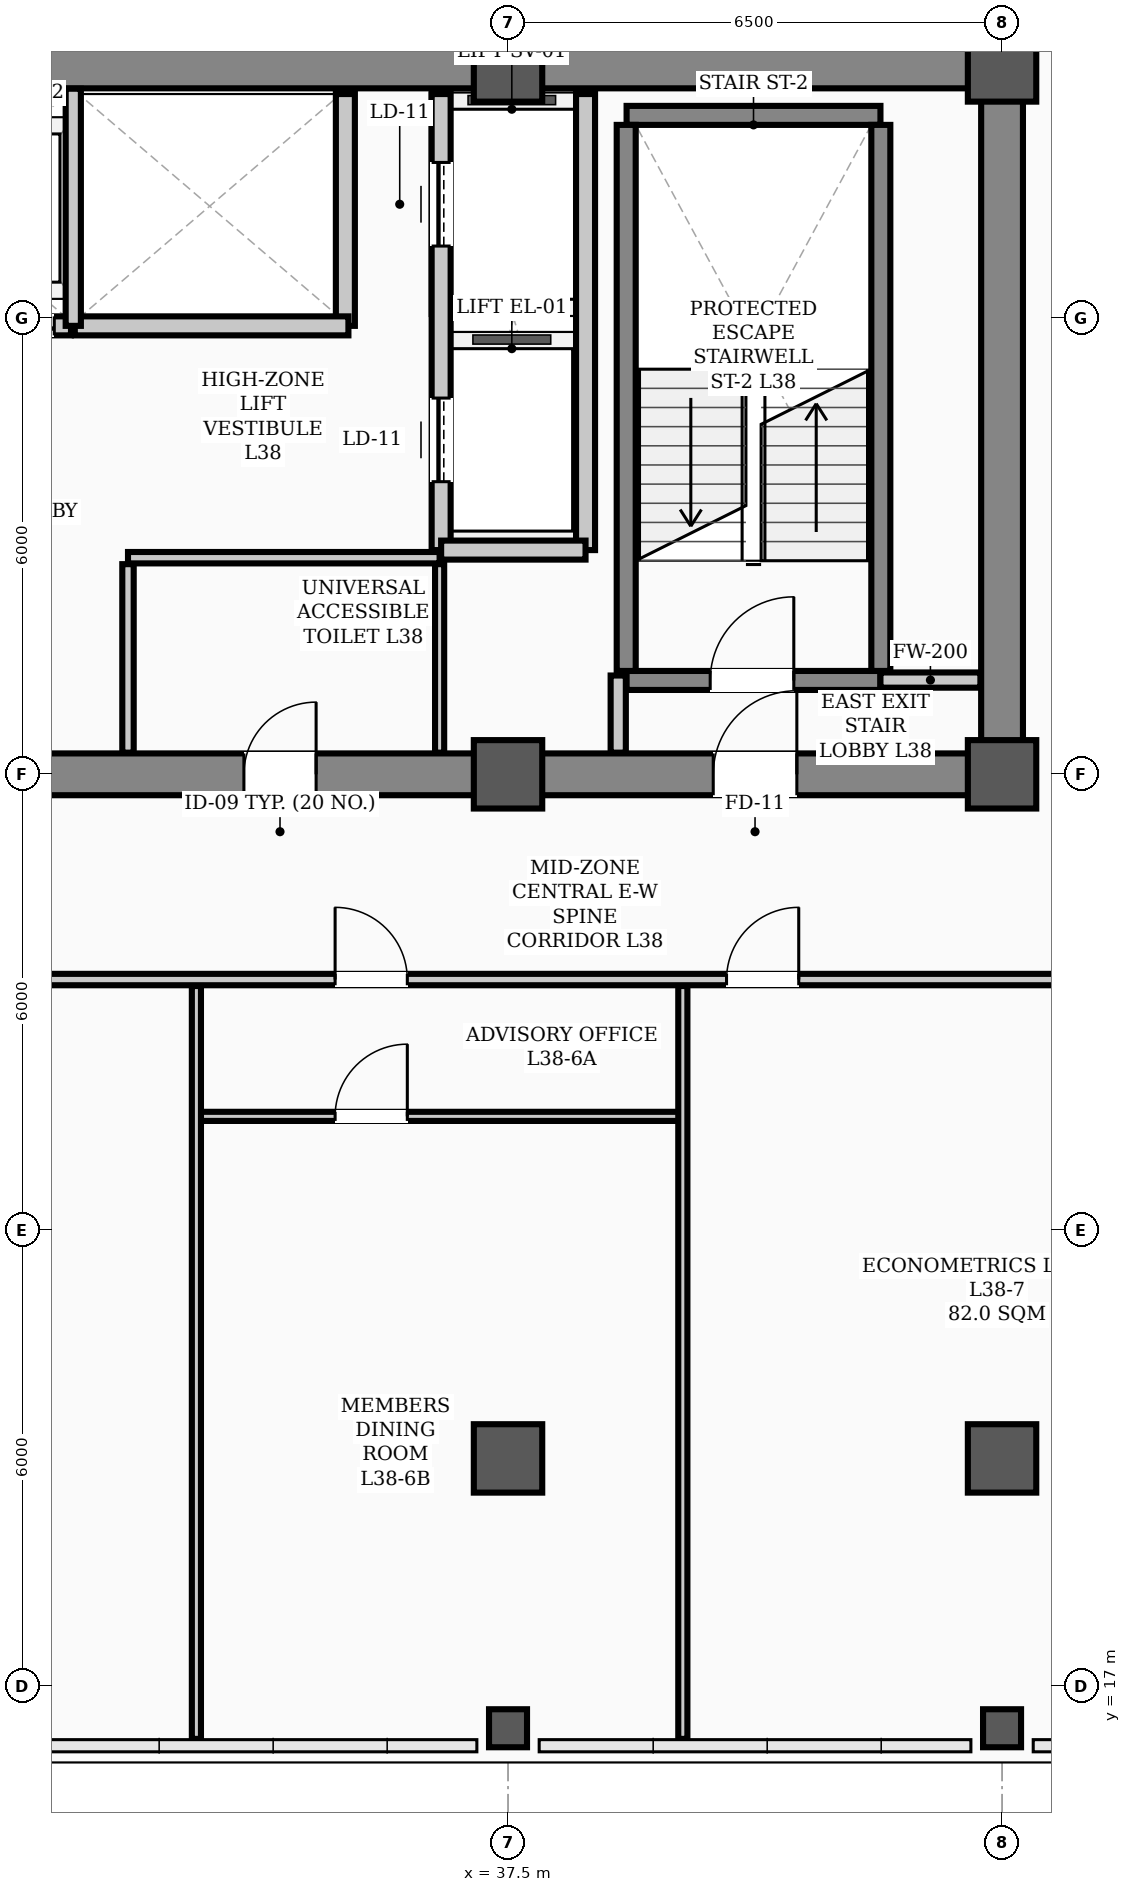
"""IFC4 building model, lengths in metres.
Left out: names, types, materials, properties, quantities, classifications, styles, units other than length and angle.
Written with IfcOpenShell. Run it as: python <this file> out.ifc"""

import sys

from ifc_helpers import new_model, si_unit, direction, frame, frame_2d, origin, origin_2d, place, context, subcontext, project, spatial, rectangle, hollow_rectangle, extrude, element, fill, save


model = new_model("IFC4")
c1 = context("Model", 3, precision=1e-05, world=origin(), true_north=direction((0.0, 1.0)))
c2 = subcontext(c1, "Body", "Model", "MODEL_VIEW")
j1 = project(units=[si_unit("LENGTHUNIT", "METRE"), si_unit("PLANEANGLEUNIT", "RADIAN")], contexts=[c1])
p1 = place(None, origin())
s1 = spatial("IfcSite", under=j1, at=p1, CompositionType="ELEMENT")
p2 = place(p1, origin())
s2 = spatial("IfcBuilding", under=s1, at=p2, CompositionType="ELEMENT")
p3 = place(p2, frame((0.0, 0.0, 153.9)))
s3 = spatial("IfcBuildingStorey", under=s2, at=p3, CompositionType="ELEMENT", Elevation=153.9)
for number, where, z_axis, x_axis in (
    (1, (37.5, 29.0, 0.0), (0.0, 0.0, 1.0), (1.0, 0.0, 0.0)),
    (2, (37.5, 38.3, 0.0), (0.0, 0.0, 1.0), (1.0, 0.0, 0.0)),
    (3, (44.0, 29.0, 0.0), (0.0, 0.0, 1.0), (1.0, 0.0, 0.0)),
    (4, (44.0, 38.3, 0.0), (0.0, 0.0, 1.0), (1.0, 0.0, 0.0)),
    (5, (37.5, 20.0, 0.0), (0.0, 0.0, 1.0), (1.0, 0.0, 0.0)),
    (6, (44.0, 20.0, 0.0), (0.0, 0.0, 1.0), (1.0, 0.0, 0.0)),
):
    element("IfcColumn", number, at=place(p3, frame(where, z_axis=z_axis, x_axis=x_axis)), inside=s3, PredefinedType="COLUMN", context=c2, shape_type="SweptSolid", body=[
        extrude(hollow_rectangle(XDim=0.9, YDim=0.9, WallThickness=0.035, InnerFilletRadius=0.017, OuterFilletRadius=0.052, at=origin_2d()), origin(), (0.0, 0.0, 1.0), 3.9),
    ])
for number, where, z_axis, x_axis in (
    (7, (37.5, 16.45, 0.0), (0.0, 0.0, 1.0), (1.0, 0.0, 0.0)),
    (8, (44.0, 16.45, 0.0), (0.0, 0.0, 1.0), (1.0, 0.0, 0.0)),
):
    element("IfcColumn", number, at=place(p3, frame(where, z_axis=z_axis, x_axis=x_axis)), inside=s3, PredefinedType="COLUMN", context=c2, shape_type="SweptSolid", body=[
        extrude(hollow_rectangle(XDim=0.5, YDim=0.5, WallThickness=0.024, InnerFilletRadius=0.012, OuterFilletRadius=0.036, at=origin_2d()), origin(), (0.0, 0.0, 1.0), 3.9),
    ])
p4 = place(p3, frame((13.5, 29.0, 0.0), z_axis=(0.0, 0.0, 1.0), x_axis=(1.0, 0.0, 0.0)))
e9 = element("IfcWall", 9, at=p4, inside=s3, PredefinedType="SHEAR", context=c2, shape_type="SweptSolid", body=[
    extrude(rectangle(XDim=30.5, YDim=0.55, at=frame_2d((15.25, 0.0))), origin(), (0.0, 0.0, 1.0), 3.72),
])
p5 = place(p4, frame((1.75, 0.0, 0.0)))
e10 = element("IfcOpeningElement", 10, at=p5, cuts=e9, PredefinedType="OPENING", context=c2, shape_type="SweptSolid", body=[
    extrude(rectangle(XDim=1.1, YDim=2.08, at=frame_2d((0.55, 1.04))), frame((0.0, 0.285, 0.0), z_axis=(0.0, -1.0, 0.0), x_axis=(1.0, 0.0, 0.0)), (0.0, 0.0, 1.0), 0.57),
])
p6 = place(p4, frame((26.7, 0.0, 0.0)))
e11 = element("IfcOpeningElement", 11, at=p6, cuts=e9, PredefinedType="OPENING", context=c2, shape_type="SweptSolid", body=[
    extrude(rectangle(XDim=1.1, YDim=2.08, at=frame_2d((0.55, 1.04))), frame((0.0, 0.285, 0.0), z_axis=(0.0, -1.0, 0.0), x_axis=(1.0, 0.0, 0.0)), (0.0, 0.0, 1.0), 0.57),
])
p7 = place(p4, frame((6.8, 0.0, 0.0)))
e12 = element("IfcOpeningElement", 12, at=p7, cuts=e9, PredefinedType="OPENING", context=c2, shape_type="SweptSolid", body=[
    extrude(rectangle(XDim=1.1, YDim=2.08, at=frame_2d((0.55, 1.04))), frame((0.0, 0.285, 0.0), z_axis=(0.0, -1.0, 0.0), x_axis=(1.0, 0.0, 0.0)), (0.0, 0.0, 1.0), 0.57),
])
p8 = place(p4, frame((13.2, 0.0, 0.0)))
e13 = element("IfcOpeningElement", 13, at=p8, cuts=e9, PredefinedType="OPENING", context=c2, shape_type="SweptSolid", body=[
    extrude(rectangle(XDim=1.6, YDim=2.08, at=frame_2d((0.8, 1.04))), frame((0.0, 0.285, 0.0), z_axis=(0.0, -1.0, 0.0), x_axis=(1.0, 0.0, 0.0)), (0.0, 0.0, 1.0), 0.57),
])
p9 = place(p4, frame((20.525, 0.0, 0.0)))
e14 = element("IfcOpeningElement", 14, at=p9, cuts=e9, PredefinedType="OPENING", context=c2, shape_type="SweptSolid", body=[
    extrude(rectangle(XDim=0.95, YDim=2.08, at=frame_2d((0.475, 1.04))), frame((0.0, 0.285, 0.0), z_axis=(0.0, -1.0, 0.0), x_axis=(1.0, 0.0, 0.0)), (0.0, 0.0, 1.0), 0.57),
])
p10 = place(p3, frame((13.5, 38.3, 0.0), z_axis=(0.0, 0.0, 1.0), x_axis=(1.0, 0.0, 0.0)))
e15 = element("IfcWall", 15, at=p10, inside=s3, PredefinedType="SHEAR", context=c2, shape_type="SweptSolid", body=[
    extrude(rectangle(XDim=30.5, YDim=0.55, at=frame_2d((15.25, 0.0))), origin(), (0.0, 0.0, 1.0), 3.72),
])
p11 = place(p3, frame((44.0, 29.35, 0.0), z_axis=(0.0, 0.0, 1.0), x_axis=(0.0, 1.0, 0.0)))
e16 = element("IfcWall", 16, at=p11, inside=s3, PredefinedType="SHEAR", context=c2, shape_type="SweptSolid", body=[
    extrude(rectangle(XDim=8.6, YDim=0.55, at=frame_2d((4.3, 0.0))), origin(), (0.0, 0.0, 1.0), 3.72),
])
p12 = place(p3, frame((39.06, 30.235, 0.0), z_axis=(0.0, 0.0, 1.0), x_axis=(1.0, 0.0, 0.0)))
e17 = element("IfcWall", 17, at=p12, inside=s3, PredefinedType="STANDARD", context=c2, shape_type="SweptSolid", body=[
    extrude(rectangle(XDim=3.34, YDim=0.25, at=frame_2d((1.67, 0.0))), origin(), (0.0, 0.0, 1.0), 3.72),
])
p13 = place(p12, frame((1.1, 0.0, 0.0)))
e18 = element("IfcOpeningElement", 18, at=p13, cuts=e17, PredefinedType="OPENING", context=c2, shape_type="SweptSolid", body=[
    extrude(rectangle(XDim=1.1, YDim=2.08, at=frame_2d((0.55, 1.04))), frame((0.0, 0.135, 0.0), z_axis=(0.0, -1.0, 0.0), x_axis=(1.0, 0.0, 0.0)), (0.0, 0.0, 1.0), 0.27),
])
p14 = place(p3, frame((39.06, 37.669, 0.0), z_axis=(0.0, 0.0, 1.0), x_axis=(1.0, 0.0, 0.0)))
e19 = element("IfcWall", 19, at=p14, inside=s3, PredefinedType="STANDARD", context=c2, shape_type="SweptSolid", body=[
    extrude(rectangle(XDim=3.34, YDim=0.25, at=frame_2d((1.67, 0.0))), origin(), (0.0, 0.0, 1.0), 3.72),
])
for number, where, z_axis, x_axis in (
    (20, (39.055, 30.36, 0.0), (0.0, 0.0, 1.0), (0.0, 1.0, 0.0)),
    (21, (42.405, 30.36, 0.0), (0.0, 0.0, 1.0), (0.0, 1.0, 0.0)),
):
    element("IfcWall", number, at=place(p3, frame(where, z_axis=z_axis, x_axis=x_axis)), inside=s3, PredefinedType="STANDARD", context=c2, shape_type="SweptSolid", body=[
        extrude(rectangle(XDim=7.184, YDim=0.25, at=frame_2d((3.592, 0.0))), origin(), (0.0, 0.0, 1.0), 3.72),
    ])
p15 = place(p3, frame((36.62, 31.95, 0.0), z_axis=(0.0, 0.0, 1.0), x_axis=(0.0, 1.0, 0.0)))
e22 = element("IfcWall", 22, at=p15, inside=s3, PredefinedType="STANDARD", context=c2, shape_type="SweptSolid", body=[
    extrude(rectangle(XDim=6.0, YDim=0.25, at=frame_2d((3.0, 0.0))), origin(), (0.0, 0.0, 1.0), 3.35),
])
p16 = place(p15, frame((0.9, 0.0, 0.0)))
e23 = element("IfcOpeningElement", 23, at=p16, cuts=e22, PredefinedType="OPENING", context=c2, shape_type="SweptSolid", body=[
    extrude(rectangle(XDim=1.1, YDim=2.08, at=frame_2d((0.55, 1.04))), frame((0.0, 0.135, 0.0), z_axis=(0.0, -1.0, 0.0), x_axis=(1.0, 0.0, 0.0)), (0.0, 0.0, 1.0), 0.27),
])
p17 = place(p15, frame((4.0, 0.0, 0.0)))
e24 = element("IfcOpeningElement", 24, at=p17, cuts=e22, PredefinedType="OPENING", context=c2, shape_type="SweptSolid", body=[
    extrude(rectangle(XDim=1.1, YDim=2.08, at=frame_2d((0.55, 1.04))), frame((0.0, 0.135, 0.0), z_axis=(0.0, -1.0, 0.0), x_axis=(1.0, 0.0, 0.0)), (0.0, 0.0, 1.0), 0.27),
])
p18 = place(p3, frame((38.52, 31.95, 0.0), z_axis=(0.0, 0.0, 1.0), x_axis=(0.0, 1.0, 0.0)))
e25 = element("IfcWall", 25, at=p18, inside=s3, PredefinedType="STANDARD", context=c2, shape_type="SweptSolid", body=[
    extrude(rectangle(XDim=6.0, YDim=0.25, at=frame_2d((3.0, 0.0))), origin(), (0.0, 0.0, 1.0), 3.35),
])
p19 = place(p3, frame((36.62, 31.95, 0.0), z_axis=(0.0, 0.0, 1.0), x_axis=(1.0, 0.0, 0.0)))
e26 = element("IfcWall", 26, at=p19, inside=s3, PredefinedType="STANDARD", context=c2, shape_type="SweptSolid", body=[
    extrude(rectangle(XDim=1.9, YDim=0.25, at=frame_2d((0.95, 0.0))), origin(), (0.0, 0.0, 1.0), 3.48),
])
p20 = place(p3, frame((35.36, 34.9, 0.0), z_axis=(0.0, 0.0, 1.0), x_axis=(0.0, 1.0, 0.0)))
e27 = element("IfcWall", 27, at=p20, inside=s3, PredefinedType="STANDARD", context=c2, shape_type="SweptSolid", body=[
    extrude(rectangle(XDim=3.05, YDim=0.25, at=frame_2d((1.525, 0.0))), origin(), (0.0, 0.0, 1.0), 3.35),
])
p21 = place(p3, frame((28.2, 34.9, 0.0), z_axis=(0.0, 0.0, 1.0), x_axis=(1.0, 0.0, 0.0)))
e28 = element("IfcWall", 28, at=p21, inside=s3, PredefinedType="STANDARD", context=c2, shape_type="SweptSolid", body=[
    extrude(rectangle(XDim=3.55, YDim=0.25, at=frame_2d((1.775, 0.0))), origin(), (0.0, 0.0, 1.0), 3.72),
])
p22 = place(p21, frame((0.23, 0.0, 0.0)))
e29 = element("IfcOpeningElement", 29, at=p22, cuts=e28, PredefinedType="OPENING", context=c2, shape_type="SweptSolid", body=[
    extrude(rectangle(XDim=1.3, YDim=2.08, at=frame_2d((0.65, 1.04))), frame((0.0, 0.135, 0.0), z_axis=(0.0, -1.0, 0.0), x_axis=(1.0, 0.0, 0.0)), (0.0, 0.0, 1.0), 0.27),
])
p23 = place(p21, frame((2.03, 0.0, 0.0)))
e30 = element("IfcOpeningElement", 30, at=p23, cuts=e28, PredefinedType="OPENING", context=c2, shape_type="SweptSolid", body=[
    extrude(rectangle(XDim=1.3, YDim=2.08, at=frame_2d((0.65, 1.04))), frame((0.0, 0.135, 0.0), z_axis=(0.0, -1.0, 0.0), x_axis=(1.0, 0.0, 0.0)), (0.0, 0.0, 1.0), 0.27),
])
p24 = place(p3, frame((31.8, 34.9, 0.0), z_axis=(0.0, 0.0, 1.0), x_axis=(1.0, 0.0, 0.0)))
e31 = element("IfcWall", 31, at=p24, inside=s3, PredefinedType="STANDARD", context=c2, shape_type="SweptSolid", body=[
    extrude(rectangle(XDim=3.6, YDim=0.25, at=frame_2d((1.8, 0.0))), origin(), (0.0, 0.0, 1.0), 3.72),
])
p25 = place(p3, frame((42.4, 30.24, 0.0), z_axis=(0.0, 0.0, 1.0), x_axis=(1.0, 0.0, 0.0)))
e32 = element("IfcWall", 32, at=p25, inside=s3, PredefinedType="STANDARD", context=c2, shape_type="SweptSolid", body=[
    extrude(rectangle(XDim=1.315, YDim=0.2, at=frame_2d((0.658, 0.0))), origin(), (0.0, 0.0, 1.0), 3.2),
])
p26 = place(p3, frame((32.5, 31.85, 0.0), z_axis=(0.0, 0.0, 1.0), x_axis=(1.0, 0.0, 0.0)))
e33 = element("IfcWall", 33, at=p26, inside=s3, PredefinedType="PARTITIONING", context=c2, shape_type="SweptSolid", body=[
    extrude(rectangle(XDim=4.1, YDim=0.15, at=frame_2d((2.05, 0.0))), origin(), (0.0, 0.0, 1.0), 3.72),
])
p27 = place(p3, frame((2.31, 26.3, 0.0), z_axis=(0.0, 0.0, 1.0), x_axis=(1.0, 0.0, 0.0)))
e34 = element("IfcWall", 34, at=p27, inside=s3, PredefinedType="PARTITIONING", context=c2, shape_type="SweptSolid", body=[
    extrude(rectangle(XDim=46.38, YDim=0.15, at=frame_2d((23.19, 0.0))), origin(), (0.0, 0.0, 1.0), 3.2),
])
p28 = place(p27, frame((9.19, 0.0, 0.0)))
e35 = element("IfcOpeningElement", 35, at=p28, cuts=e34, PredefinedType="OPENING", context=c2, shape_type="SweptSolid", body=[
    extrude(rectangle(XDim=0.95, YDim=2.08, at=frame_2d((0.475, 1.04))), frame((0.0, 0.085, 0.0), z_axis=(0.0, -1.0, 0.0), x_axis=(1.0, 0.0, 0.0)), (0.0, 0.0, 1.0), 0.17),
])
p29 = place(p27, frame((14.815, 0.0, 0.0)))
e36 = element("IfcOpeningElement", 36, at=p29, cuts=e34, PredefinedType="OPENING", context=c2, shape_type="SweptSolid", body=[
    extrude(rectangle(XDim=0.95, YDim=2.08, at=frame_2d((0.475, 1.04))), frame((0.0, 0.085, 0.0), z_axis=(0.0, -1.0, 0.0), x_axis=(1.0, 0.0, 0.0)), (0.0, 0.0, 1.0), 0.17),
])
p30 = place(p27, frame((19.015, 0.0, 0.0)))
e37 = element("IfcOpeningElement", 37, at=p30, cuts=e34, PredefinedType="OPENING", context=c2, shape_type="SweptSolid", body=[
    extrude(rectangle(XDim=0.95, YDim=2.08, at=frame_2d((0.475, 1.04))), frame((0.0, 0.085, 0.0), z_axis=(0.0, -1.0, 0.0), x_axis=(1.0, 0.0, 0.0)), (0.0, 0.0, 1.0), 0.17),
])
p31 = place(p27, frame((26.315, 0.0, 0.0)))
e38 = element("IfcOpeningElement", 38, at=p31, cuts=e34, PredefinedType="OPENING", context=c2, shape_type="SweptSolid", body=[
    extrude(rectangle(XDim=0.95, YDim=2.08, at=frame_2d((0.475, 1.04))), frame((0.0, 0.085, 0.0), z_axis=(0.0, -1.0, 0.0), x_axis=(1.0, 0.0, 0.0)), (0.0, 0.0, 1.0), 0.17),
])
p32 = place(p27, frame((32.915, 0.0, 0.0)))
e39 = element("IfcOpeningElement", 39, at=p32, cuts=e34, PredefinedType="OPENING", context=c2, shape_type="SweptSolid", body=[
    extrude(rectangle(XDim=0.95, YDim=2.08, at=frame_2d((0.475, 1.04))), frame((0.0, 0.085, 0.0), z_axis=(0.0, -1.0, 0.0), x_axis=(1.0, 0.0, 0.0)), (0.0, 0.0, 1.0), 0.17),
])
p33 = place(p27, frame((38.065, 0.0, 0.0)))
e40 = element("IfcOpeningElement", 40, at=p33, cuts=e34, PredefinedType="OPENING", context=c2, shape_type="SweptSolid", body=[
    extrude(rectangle(XDim=0.95, YDim=2.08, at=frame_2d((0.475, 1.04))), frame((0.0, 0.085, 0.0), z_axis=(0.0, -1.0, 0.0), x_axis=(1.0, 0.0, 0.0)), (0.0, 0.0, 1.0), 0.17),
])
p34 = place(p3, frame((33.4, 24.5, 0.0), z_axis=(0.0, 0.0, 1.0), x_axis=(1.0, 0.0, 0.0)))
e41 = element("IfcWall", 41, at=p34, inside=s3, PredefinedType="PARTITIONING", context=c2, shape_type="SweptSolid", body=[
    extrude(rectangle(XDim=6.4, YDim=0.12, at=frame_2d((3.2, 0.0))), origin(), (0.0, 0.0, 1.0), 3.2),
])
p35 = place(p34, frame((1.825, 0.0, 0.0)))
e42 = element("IfcOpeningElement", 42, at=p35, cuts=e41, PredefinedType="OPENING", context=c2, shape_type="SweptSolid", body=[
    extrude(rectangle(XDim=0.95, YDim=2.08, at=frame_2d((0.475, 1.04))), frame((0.0, 0.07, 0.0), z_axis=(0.0, -1.0, 0.0), x_axis=(1.0, 0.0, 0.0)), (0.0, 0.0, 1.0), 0.14),
])
p36 = place(p3, frame((38.95, 29.285, 0.0), z_axis=(0.0, 0.0, 1.0), x_axis=(0.0, 1.0, 0.0)))
e43 = element("IfcWall", 43, at=p36, inside=s3, PredefinedType="STANDARD", context=c2, shape_type="SweptSolid", body=[
    extrude(rectangle(XDim=1.015, YDim=0.2, at=frame_2d((0.508, 0.0))), origin(), (0.0, 0.0, 1.0), 3.35),
])
p37 = place(p3, frame((32.5, 29.285, 0.0), z_axis=(0.0, 0.0, 1.0), x_axis=(0.0, 1.0, 0.0)))
e44 = element("IfcWall", 44, at=p37, inside=s3, PredefinedType="PARTITIONING", context=c2, shape_type="SweptSolid", body=[
    extrude(rectangle(XDim=2.48, YDim=0.15, at=frame_2d((1.24, 0.0))), origin(), (0.0, 0.0, 1.0), 3.35),
])
p38 = place(p3, frame((36.6, 29.285, 0.0), z_axis=(0.0, 0.0, 1.0), x_axis=(0.0, 1.0, 0.0)))
e45 = element("IfcWall", 45, at=p38, inside=s3, PredefinedType="PARTITIONING", context=c2, shape_type="SweptSolid", body=[
    extrude(rectangle(XDim=2.48, YDim=0.12, at=frame_2d((1.24, 0.0))), origin(), (0.0, 0.0, 1.0), 3.35),
])
for number, where, z_axis, x_axis in (
    (46, (33.4, 16.31, 0.0), (0.0, 0.0, 1.0), (0.0, 1.0, 0.0)),
    (47, (39.8, 16.31, 0.0), (0.0, 0.0, 1.0), (0.0, 1.0, 0.0)),
):
    element("IfcWall", number, at=place(p3, frame(where, z_axis=z_axis, x_axis=x_axis)), inside=s3, PredefinedType="PARTITIONING", context=c2, shape_type="SweptSolid", body=[
        extrude(rectangle(XDim=9.905, YDim=0.12, at=frame_2d((4.953, 0.0))), origin(), (0.0, 0.0, 1.0), 3.1),
    ])
p39 = place(p3, frame((31.78, 34.9, 0.0), z_axis=(0.0, 0.0, 1.0), x_axis=(0.0, 1.0, 0.0)))
e48 = element("IfcWall", 48, at=p39, inside=s3, PredefinedType="STANDARD", context=c2, shape_type="SweptSolid", body=[
    extrude(rectangle(XDim=3.12, YDim=0.2, at=frame_2d((1.56, 0.0))), origin(), (0.0, 0.0, 1.0), 3.35),
])
p40 = place(p13, origin())
e49 = element("IfcDoor", 49, at=p40, inside=s3, OperationType="SINGLE_SWING_RIGHT", PredefinedType="DOOR", context=c2, shape_type="SweptSolid", body=[
    extrude(rectangle(XDim=1.1, YDim=2.08, at=frame_2d((0.55, 1.04))), frame((0.0, 0.025, 0.0), z_axis=(0.0, -1.0, 0.0), x_axis=(1.0, 0.0, 0.0)), (0.0, 0.0, 1.0), 0.05),
])
fill(e18, e49)
p41 = place(p6, origin())
e50 = element("IfcDoor", 50, at=p41, inside=s3, OperationType="SINGLE_SWING_RIGHT", PredefinedType="DOOR", context=c2, shape_type="SweptSolid", body=[
    extrude(rectangle(XDim=1.1, YDim=2.08, at=frame_2d((0.55, 1.04))), frame((0.0, 0.025, 0.0), z_axis=(0.0, -1.0, 0.0), x_axis=(1.0, 0.0, 0.0)), (0.0, 0.0, 1.0), 0.05),
])
fill(e11, e50)
p42 = place(p9, origin())
e51 = element("IfcDoor", 51, at=p42, inside=s3, OperationType="SINGLE_SWING_RIGHT", PredefinedType="DOOR", context=c2, shape_type="SweptSolid", body=[
    extrude(rectangle(XDim=0.95, YDim=2.08, at=frame_2d((0.475, 1.04))), frame((0.0, 0.025, 0.0), z_axis=(0.0, -1.0, 0.0), x_axis=(1.0, 0.0, 0.0)), (0.0, 0.0, 1.0), 0.05),
])
fill(e14, e51)
p43 = place(p35, origin())
e52 = element("IfcDoor", 52, at=p43, inside=s3, OperationType="SINGLE_SWING_RIGHT", PredefinedType="DOOR", context=c2, shape_type="SweptSolid", body=[
    extrude(rectangle(XDim=0.95, YDim=2.08, at=frame_2d((0.475, 1.04))), frame((0.0, 0.025, 0.0), z_axis=(0.0, -1.0, 0.0), x_axis=(1.0, 0.0, 0.0)), (0.0, 0.0, 1.0), 0.05),
])
fill(e42, e52)
p44 = place(p32, origin())
e53 = element("IfcDoor", 53, at=p44, inside=s3, OperationType="SINGLE_SWING_LEFT", PredefinedType="DOOR", context=c2, shape_type="SweptSolid", body=[
    extrude(rectangle(XDim=0.95, YDim=2.08, at=frame_2d((0.475, 1.04))), frame((0.0, 0.025, 0.0), z_axis=(0.0, -1.0, 0.0), x_axis=(1.0, 0.0, 0.0)), (0.0, 0.0, 1.0), 0.05),
])
fill(e39, e53)
p45 = place(p33, origin())
e54 = element("IfcDoor", 54, at=p45, inside=s3, OperationType="SINGLE_SWING_RIGHT", PredefinedType="DOOR", context=c2, shape_type="SweptSolid", body=[
    extrude(rectangle(XDim=0.95, YDim=2.08, at=frame_2d((0.475, 1.04))), frame((0.0, 0.025, 0.0), z_axis=(0.0, -1.0, 0.0), x_axis=(1.0, 0.0, 0.0)), (0.0, 0.0, 1.0), 0.05),
])
fill(e40, e54)
p46 = place(p16, origin())
e55 = element("IfcDoor", 55, at=p46, inside=s3, OperationType="SLIDING_TO_LEFT", PredefinedType="DOOR", context=c2, shape_type="SweptSolid", body=[
    extrude(rectangle(XDim=1.1, YDim=2.08, at=frame_2d((0.55, 1.04))), frame((0.0, 0.025, 0.0), z_axis=(0.0, -1.0, 0.0), x_axis=(1.0, 0.0, 0.0)), (0.0, 0.0, 1.0), 0.05),
])
fill(e23, e55)
p47 = place(p17, origin())
e56 = element("IfcDoor", 56, at=p47, inside=s3, OperationType="SLIDING_TO_LEFT", PredefinedType="DOOR", context=c2, shape_type="SweptSolid", body=[
    extrude(rectangle(XDim=1.1, YDim=2.08, at=frame_2d((0.55, 1.04))), frame((0.0, 0.025, 0.0), z_axis=(0.0, -1.0, 0.0), x_axis=(1.0, 0.0, 0.0)), (0.0, 0.0, 1.0), 0.05),
])
fill(e24, e56)
p48 = place(p23, origin())
e57 = element("IfcDoor", 57, at=p48, inside=s3, OperationType="DOUBLE_DOOR_SLIDING", PredefinedType="DOOR", context=c2, shape_type="SweptSolid", body=[
    extrude(rectangle(XDim=1.3, YDim=2.08, at=frame_2d((0.65, 1.04))), frame((0.0, 0.025, 0.0), z_axis=(0.0, -1.0, 0.0), x_axis=(1.0, 0.0, 0.0)), (0.0, 0.0, 1.0), 0.05),
])
fill(e30, e57)
save(model, sys.argv[1])
